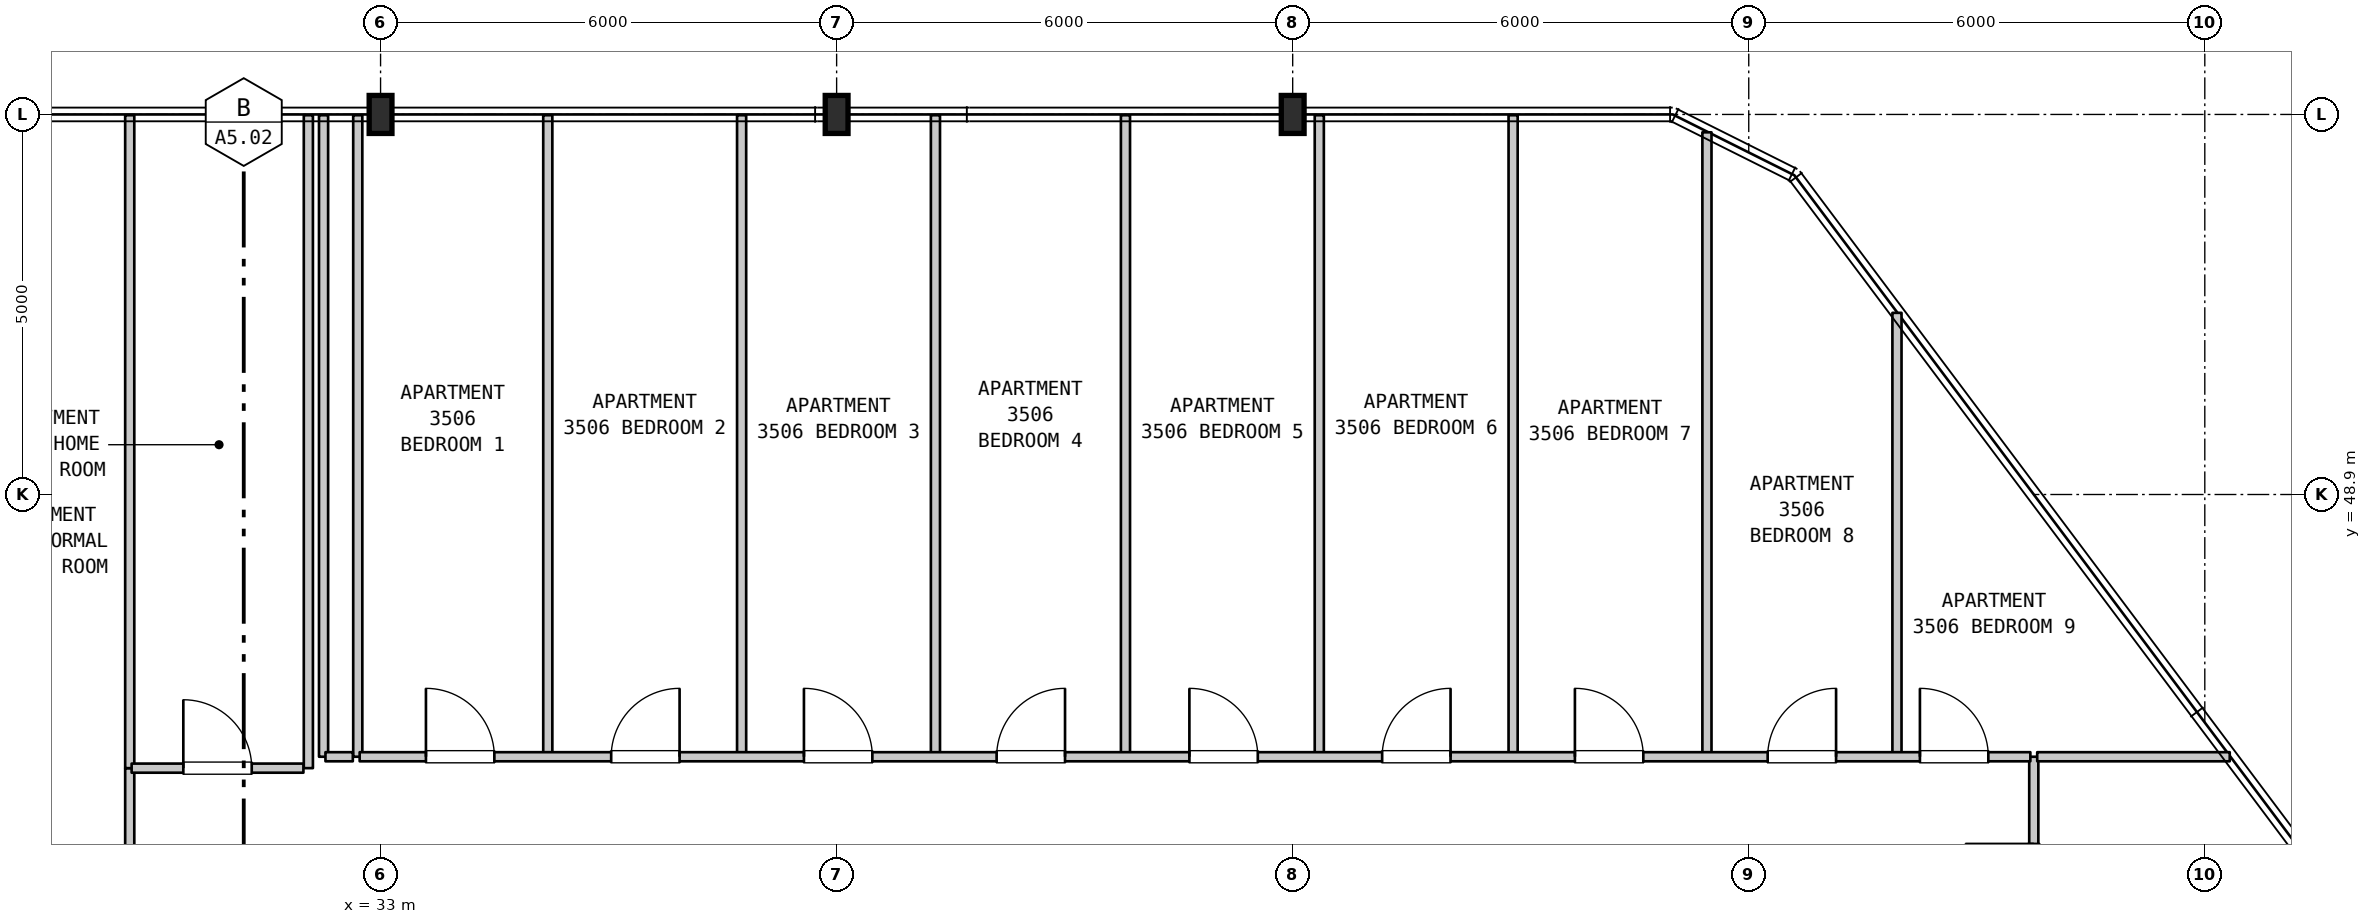
"""IFC4 building model, lengths in metres.
Left out: names, types, materials, properties, quantities, classifications, styles, units other than length and angle.
Written with IfcOpenShell. Run it as: python <this file> out.ifc"""

import sys

from ifc_helpers import new_model, si_unit, direction, frame, frame_2d, origin, origin_2d, place, context, subcontext, project, spatial, rectangle, i_section, extrude, element, fill, save


model = new_model("IFC4")
c1 = context("Model", 3, precision=1e-05, world=origin(), true_north=direction((0.0, 1.0)))
c2 = subcontext(c1, "Body", "Model", "MODEL_VIEW")
j1 = project(units=[si_unit("LENGTHUNIT", "METRE"), si_unit("PLANEANGLEUNIT", "RADIAN")], contexts=[c1])
p1 = place(None, origin())
s1 = spatial("IfcSite", under=j1, at=p1, CompositionType="ELEMENT")
p2 = place(p1, origin())
s2 = spatial("IfcBuilding", under=s1, at=p2, CompositionType="ELEMENT")
p3 = place(p2, frame((0.0, 0.0, 144.6)))
s3 = spatial("IfcBuildingStorey", under=s2, at=p3, CompositionType="ELEMENT", Elevation=144.6)
for number, where, z_axis, x_axis in (
    (1, (33.0, 53.9, 0.0), (0.0, 0.0, 1.0), (1.0, 0.0, 0.0)),
    (2, (39.0, 53.9, 0.0), (0.0, 0.0, 1.0), (1.0, 0.0, 0.0)),
    (3, (45.0, 53.9, 0.0), (0.0, 0.0, 1.0), (1.0, 0.0, 0.0)),
):
    element("IfcColumn", number, at=place(p3, frame(where, z_axis=z_axis, x_axis=x_axis)), inside=s3, PredefinedType="COLUMN", context=c2, shape_type="SweptSolid", body=[
        extrude(i_section(OverallWidth=0.3, OverallDepth=0.5, WebThickness=0.014, FlangeThickness=0.028, FilletRadius=0.027, at=origin_2d()), origin(), (0.0, 0.0, 1.0), 3.7),
    ])
p4 = place(p3, frame((29.7, 42.15, 0.0), z_axis=(0.0, 0.0, 1.0), x_axis=(0.0, 1.0, 0.0)))
e4 = element("IfcWall", 4, at=p4, inside=s3, PredefinedType="PARTITIONING", context=c2, shape_type="SweptSolid", body=[
    extrude(rectangle(XDim=3.15, YDim=0.12, at=frame_2d((1.575, 0.0))), origin(), (0.0, 0.0, 1.0), 3.385),
])
for number, where, z_axis, x_axis in (
    (5, (29.7, 45.3, 0.0), (0.0, 0.0, 1.0), (0.0, 1.0, 0.0)),
    (6, (32.05, 45.3, 0.0), (0.0, 0.0, 1.0), (0.0, 1.0, 0.0)),
):
    element("IfcWall", number, at=place(p3, frame(where, z_axis=z_axis, x_axis=x_axis)), inside=s3, PredefinedType="PARTITIONING", context=c2, shape_type="SweptSolid", body=[
        extrude(rectangle(XDim=8.59, YDim=0.12, at=frame_2d((4.295, 0.0))), origin(), (0.0, 0.0, 1.0), 3.385),
    ])
for number, where, z_axis, x_axis in (
    (7, (32.25, 45.45, 0.0), (0.0, 0.0, 1.0), (0.0, 1.0, 0.0)),
    (8, (32.7, 45.45, 0.0), (0.0, 0.0, 1.0), (0.0, 1.0, 0.0)),
    (9, (35.2, 45.45, 0.0), (0.0, 0.0, 1.0), (0.0, 1.0, 0.0)),
    (10, (37.75, 45.45, 0.0), (0.0, 0.0, 1.0), (0.0, 1.0, 0.0)),
    (11, (40.3, 45.45, 0.0), (0.0, 0.0, 1.0), (0.0, 1.0, 0.0)),
    (12, (42.8, 45.45, 0.0), (0.0, 0.0, 1.0), (0.0, 1.0, 0.0)),
    (13, (45.35, 45.45, 0.0), (0.0, 0.0, 1.0), (0.0, 1.0, 0.0)),
    (14, (47.9, 45.45, 0.0), (0.0, 0.0, 1.0), (0.0, 1.0, 0.0)),
):
    element("IfcWall", number, at=place(p3, frame(where, z_axis=z_axis, x_axis=x_axis)), inside=s3, PredefinedType="PARTITIONING", context=c2, shape_type="SweptSolid", body=[
        extrude(rectangle(XDim=8.44, YDim=0.12, at=frame_2d((4.22, 0.0))), origin(), (0.0, 0.0, 1.0), 3.385),
    ])
p5 = place(p3, frame((50.45, 45.45, 0.0), z_axis=(0.0, 0.0, 1.0), x_axis=(0.0, 1.0, 0.0)))
e15 = element("IfcWall", 15, at=p5, inside=s3, PredefinedType="PARTITIONING", context=c2, shape_type="SweptSolid", body=[
    extrude(rectangle(XDim=8.215, YDim=0.12, at=frame_2d((4.107, 0.0))), origin(), (0.0, 0.0, 1.0), 3.385),
])
p6 = place(p3, frame((52.95, 45.45, 0.0), z_axis=(0.0, 0.0, 1.0), x_axis=(0.0, 1.0, 0.0)))
e16 = element("IfcWall", 16, at=p6, inside=s3, PredefinedType="PARTITIONING", context=c2, shape_type="SweptSolid", body=[
    extrude(rectangle(XDim=5.84, YDim=0.12, at=frame_2d((2.92, 0.0))), origin(), (0.0, 0.0, 1.0), 3.385),
])
p7 = place(p3, frame((54.75, 42.4, 0.0), z_axis=(0.0, 0.0, 1.0), x_axis=(0.0, 1.0, 0.0)))
e17 = element("IfcWall", 17, at=p7, inside=s3, PredefinedType="PARTITIONING", context=c2, shape_type="SweptSolid", body=[
    extrude(rectangle(XDim=3.05, YDim=0.12, at=frame_2d((1.525, 0.0))), origin(), (0.0, 0.0, 1.0), 3.385),
])
p8 = place(p7, frame((1.003, 0.0, 0.0)))
e18 = element("IfcOpeningElement", 18, at=p8, cuts=e17, PredefinedType="OPENING", context=c2, shape_type="SweptSolid", body=[
    extrude(rectangle(XDim=0.9, YDim=2.15, at=frame_2d((0.45, 1.075))), frame((0.0, 0.07, 0.0), z_axis=(0.0, -1.0, 0.0), x_axis=(1.0, 0.0, 0.0)), (0.0, 0.0, 1.0), 0.14),
])
p9 = place(p3, frame((29.725, 45.3, 0.0), z_axis=(0.0, 0.0, 1.0), x_axis=(1.0, 0.0, 0.0)))
e19 = element("IfcWall", 19, at=p9, inside=s3, PredefinedType="PARTITIONING", context=c2, shape_type="SweptSolid", body=[
    extrude(rectangle(XDim=2.26, YDim=0.12, at=frame_2d((1.13, 0.0))), origin(), (0.0, 0.0, 1.0), 3.385),
])
p10 = place(p9, frame((0.68, 0.0, 0.0)))
e20 = element("IfcOpeningElement", 20, at=p10, cuts=e19, PredefinedType="OPENING", context=c2, shape_type="SweptSolid", body=[
    extrude(rectangle(XDim=0.9, YDim=2.15, at=frame_2d((0.45, 1.075))), frame((0.0, 0.07, 0.0), z_axis=(0.0, -1.0, 0.0), x_axis=(1.0, 0.0, 0.0)), (0.0, 0.0, 1.0), 0.14),
])
p11 = place(p3, frame((32.275, 45.45, 0.0), z_axis=(0.0, 0.0, 1.0), x_axis=(1.0, 0.0, 0.0)))
e21 = element("IfcWall", 21, at=p11, inside=s3, PredefinedType="PARTITIONING", context=c2, shape_type="SweptSolid", body=[
    extrude(rectangle(XDim=0.36, YDim=0.12, at=frame_2d((0.18, 0.0))), origin(), (0.0, 0.0, 1.0), 3.385),
])
p12 = place(p3, frame((32.725, 45.45, 0.0), z_axis=(0.0, 0.0, 1.0), x_axis=(1.0, 0.0, 0.0)))
e22 = element("IfcWall", 22, at=p12, inside=s3, PredefinedType="PARTITIONING", context=c2, shape_type="SweptSolid", body=[
    extrude(rectangle(XDim=21.98, YDim=0.12, at=frame_2d((10.99, 0.0))), origin(), (0.0, 0.0, 1.0), 3.385),
])
p13 = place(p12, frame((0.872, 0.0, 0.0)))
e23 = element("IfcOpeningElement", 23, at=p13, cuts=e22, PredefinedType="OPENING", context=c2, shape_type="SweptSolid", body=[
    extrude(rectangle(XDim=0.9, YDim=2.15, at=frame_2d((0.45, 1.075))), frame((0.0, 0.07, 0.0), z_axis=(0.0, -1.0, 0.0), x_axis=(1.0, 0.0, 0.0)), (0.0, 0.0, 1.0), 0.14),
])
p14 = place(p12, frame((3.309, 0.0, 0.0)))
e24 = element("IfcOpeningElement", 24, at=p14, cuts=e22, PredefinedType="OPENING", context=c2, shape_type="SweptSolid", body=[
    extrude(rectangle(XDim=0.9, YDim=2.15, at=frame_2d((0.45, 1.075))), frame((0.0, 0.07, 0.0), z_axis=(0.0, -1.0, 0.0), x_axis=(1.0, 0.0, 0.0)), (0.0, 0.0, 1.0), 0.14),
])
p15 = place(p12, frame((5.845, 0.0, 0.0)))
e25 = element("IfcOpeningElement", 25, at=p15, cuts=e22, PredefinedType="OPENING", context=c2, shape_type="SweptSolid", body=[
    extrude(rectangle(XDim=0.9, YDim=2.15, at=frame_2d((0.45, 1.075))), frame((0.0, 0.07, 0.0), z_axis=(0.0, -1.0, 0.0), x_axis=(1.0, 0.0, 0.0)), (0.0, 0.0, 1.0), 0.14),
])
p16 = place(p12, frame((8.38, 0.0, 0.0)))
e26 = element("IfcOpeningElement", 26, at=p16, cuts=e22, PredefinedType="OPENING", context=c2, shape_type="SweptSolid", body=[
    extrude(rectangle(XDim=0.9, YDim=2.15, at=frame_2d((0.45, 1.075))), frame((0.0, 0.07, 0.0), z_axis=(0.0, -1.0, 0.0), x_axis=(1.0, 0.0, 0.0)), (0.0, 0.0, 1.0), 0.14),
])
p17 = place(p12, frame((10.916, 0.0, 0.0)))
e27 = element("IfcOpeningElement", 27, at=p17, cuts=e22, PredefinedType="OPENING", context=c2, shape_type="SweptSolid", body=[
    extrude(rectangle(XDim=0.9, YDim=2.15, at=frame_2d((0.45, 1.075))), frame((0.0, 0.07, 0.0), z_axis=(0.0, -1.0, 0.0), x_axis=(1.0, 0.0, 0.0)), (0.0, 0.0, 1.0), 0.14),
])
p18 = place(p12, frame((13.452, 0.0, 0.0)))
e28 = element("IfcOpeningElement", 28, at=p18, cuts=e22, PredefinedType="OPENING", context=c2, shape_type="SweptSolid", body=[
    extrude(rectangle(XDim=0.9, YDim=2.15, at=frame_2d((0.45, 1.075))), frame((0.0, 0.07, 0.0), z_axis=(0.0, -1.0, 0.0), x_axis=(1.0, 0.0, 0.0)), (0.0, 0.0, 1.0), 0.14),
])
p19 = place(p12, frame((15.988, 0.0, 0.0)))
e29 = element("IfcOpeningElement", 29, at=p19, cuts=e22, PredefinedType="OPENING", context=c2, shape_type="SweptSolid", body=[
    extrude(rectangle(XDim=0.9, YDim=2.15, at=frame_2d((0.45, 1.075))), frame((0.0, 0.07, 0.0), z_axis=(0.0, -1.0, 0.0), x_axis=(1.0, 0.0, 0.0)), (0.0, 0.0, 1.0), 0.14),
])
p20 = place(p12, frame((18.524, 0.0, 0.0)))
e30 = element("IfcOpeningElement", 30, at=p20, cuts=e22, PredefinedType="OPENING", context=c2, shape_type="SweptSolid", body=[
    extrude(rectangle(XDim=0.9, YDim=2.15, at=frame_2d((0.45, 1.075))), frame((0.0, 0.07, 0.0), z_axis=(0.0, -1.0, 0.0), x_axis=(1.0, 0.0, 0.0)), (0.0, 0.0, 1.0), 0.14),
])
p21 = place(p12, frame((20.527, 0.0, 0.0)))
e31 = element("IfcOpeningElement", 31, at=p21, cuts=e22, PredefinedType="OPENING", context=c2, shape_type="SweptSolid", body=[
    extrude(rectangle(XDim=0.9, YDim=2.15, at=frame_2d((0.45, 1.075))), frame((0.0, 0.07, 0.0), z_axis=(0.0, -1.0, 0.0), x_axis=(1.0, 0.0, 0.0)), (0.0, 0.0, 1.0), 0.14),
])
p22 = place(p3, frame((54.795, 45.45, 0.0), z_axis=(0.0, 0.0, 1.0), x_axis=(1.0, 0.0, 0.0)))
e32 = element("IfcWall", 32, at=p22, inside=s3, PredefinedType="PARTITIONING", context=c2, shape_type="SweptSolid", body=[
    extrude(rectangle(XDim=2.533, YDim=0.12, at=frame_2d((1.267, 0.0))), origin(), (0.0, 0.0, 1.0), 3.385),
])
p23 = place(p8, origin())
e33 = element("IfcDoor", 33, at=p23, inside=s3, OperationType="SINGLE_SWING_RIGHT", PredefinedType="DOOR", context=c2, shape_type="SweptSolid", body=[
    extrude(rectangle(XDim=0.9, YDim=2.15, at=frame_2d((0.45, 1.075))), frame((0.0, 0.025, 0.0), z_axis=(0.0, -1.0, 0.0), x_axis=(1.0, 0.0, 0.0)), (0.0, 0.0, 1.0), 0.05),
])
fill(e18, e33)
p24 = place(p10, origin())
e34 = element("IfcDoor", 34, at=p24, inside=s3, OperationType="SINGLE_SWING_LEFT", PredefinedType="DOOR", context=c2, shape_type="SweptSolid", body=[
    extrude(rectangle(XDim=0.9, YDim=2.15, at=frame_2d((0.45, 1.075))), frame((0.0, 0.025, 0.0), z_axis=(0.0, -1.0, 0.0), x_axis=(1.0, 0.0, 0.0)), (0.0, 0.0, 1.0), 0.05),
])
fill(e20, e34)
p25 = place(p13, origin())
e35 = element("IfcDoor", 35, at=p25, inside=s3, OperationType="SINGLE_SWING_LEFT", PredefinedType="DOOR", context=c2, shape_type="SweptSolid", body=[
    extrude(rectangle(XDim=0.9, YDim=2.15, at=frame_2d((0.45, 1.075))), frame((0.0, 0.025, 0.0), z_axis=(0.0, -1.0, 0.0), x_axis=(1.0, 0.0, 0.0)), (0.0, 0.0, 1.0), 0.05),
])
fill(e23, e35)
p26 = place(p14, origin())
e36 = element("IfcDoor", 36, at=p26, inside=s3, OperationType="SINGLE_SWING_RIGHT", PredefinedType="DOOR", context=c2, shape_type="SweptSolid", body=[
    extrude(rectangle(XDim=0.9, YDim=2.15, at=frame_2d((0.45, 1.075))), frame((0.0, 0.025, 0.0), z_axis=(0.0, -1.0, 0.0), x_axis=(1.0, 0.0, 0.0)), (0.0, 0.0, 1.0), 0.05),
])
fill(e24, e36)
p27 = place(p15, origin())
e37 = element("IfcDoor", 37, at=p27, inside=s3, OperationType="SINGLE_SWING_LEFT", PredefinedType="DOOR", context=c2, shape_type="SweptSolid", body=[
    extrude(rectangle(XDim=0.9, YDim=2.15, at=frame_2d((0.45, 1.075))), frame((0.0, 0.025, 0.0), z_axis=(0.0, -1.0, 0.0), x_axis=(1.0, 0.0, 0.0)), (0.0, 0.0, 1.0), 0.05),
])
fill(e25, e37)
p28 = place(p16, origin())
e38 = element("IfcDoor", 38, at=p28, inside=s3, OperationType="SINGLE_SWING_RIGHT", PredefinedType="DOOR", context=c2, shape_type="SweptSolid", body=[
    extrude(rectangle(XDim=0.9, YDim=2.15, at=frame_2d((0.45, 1.075))), frame((0.0, 0.025, 0.0), z_axis=(0.0, -1.0, 0.0), x_axis=(1.0, 0.0, 0.0)), (0.0, 0.0, 1.0), 0.05),
])
fill(e26, e38)
p29 = place(p17, origin())
e39 = element("IfcDoor", 39, at=p29, inside=s3, OperationType="SINGLE_SWING_LEFT", PredefinedType="DOOR", context=c2, shape_type="SweptSolid", body=[
    extrude(rectangle(XDim=0.9, YDim=2.15, at=frame_2d((0.45, 1.075))), frame((0.0, 0.025, 0.0), z_axis=(0.0, -1.0, 0.0), x_axis=(1.0, 0.0, 0.0)), (0.0, 0.0, 1.0), 0.05),
])
fill(e27, e39)
p30 = place(p18, origin())
e40 = element("IfcDoor", 40, at=p30, inside=s3, OperationType="SINGLE_SWING_RIGHT", PredefinedType="DOOR", context=c2, shape_type="SweptSolid", body=[
    extrude(rectangle(XDim=0.9, YDim=2.15, at=frame_2d((0.45, 1.075))), frame((0.0, 0.025, 0.0), z_axis=(0.0, -1.0, 0.0), x_axis=(1.0, 0.0, 0.0)), (0.0, 0.0, 1.0), 0.05),
])
fill(e28, e40)
p31 = place(p19, origin())
e41 = element("IfcDoor", 41, at=p31, inside=s3, OperationType="SINGLE_SWING_LEFT", PredefinedType="DOOR", context=c2, shape_type="SweptSolid", body=[
    extrude(rectangle(XDim=0.9, YDim=2.15, at=frame_2d((0.45, 1.075))), frame((0.0, 0.025, 0.0), z_axis=(0.0, -1.0, 0.0), x_axis=(1.0, 0.0, 0.0)), (0.0, 0.0, 1.0), 0.05),
])
fill(e29, e41)
p32 = place(p20, origin())
e42 = element("IfcDoor", 42, at=p32, inside=s3, OperationType="SINGLE_SWING_RIGHT", PredefinedType="DOOR", context=c2, shape_type="SweptSolid", body=[
    extrude(rectangle(XDim=0.9, YDim=2.15, at=frame_2d((0.45, 1.075))), frame((0.0, 0.025, 0.0), z_axis=(0.0, -1.0, 0.0), x_axis=(1.0, 0.0, 0.0)), (0.0, 0.0, 1.0), 0.05),
])
fill(e30, e42)
p33 = place(p21, origin())
e43 = element("IfcDoor", 43, at=p33, inside=s3, OperationType="SINGLE_SWING_LEFT", PredefinedType="DOOR", context=c2, shape_type="SweptSolid", body=[
    extrude(rectangle(XDim=0.9, YDim=2.15, at=frame_2d((0.45, 1.075))), frame((0.0, 0.025, 0.0), z_axis=(0.0, -1.0, 0.0), x_axis=(1.0, 0.0, 0.0)), (0.0, 0.0, 1.0), 0.05),
])
fill(e31, e43)
save(model, sys.argv[1])
